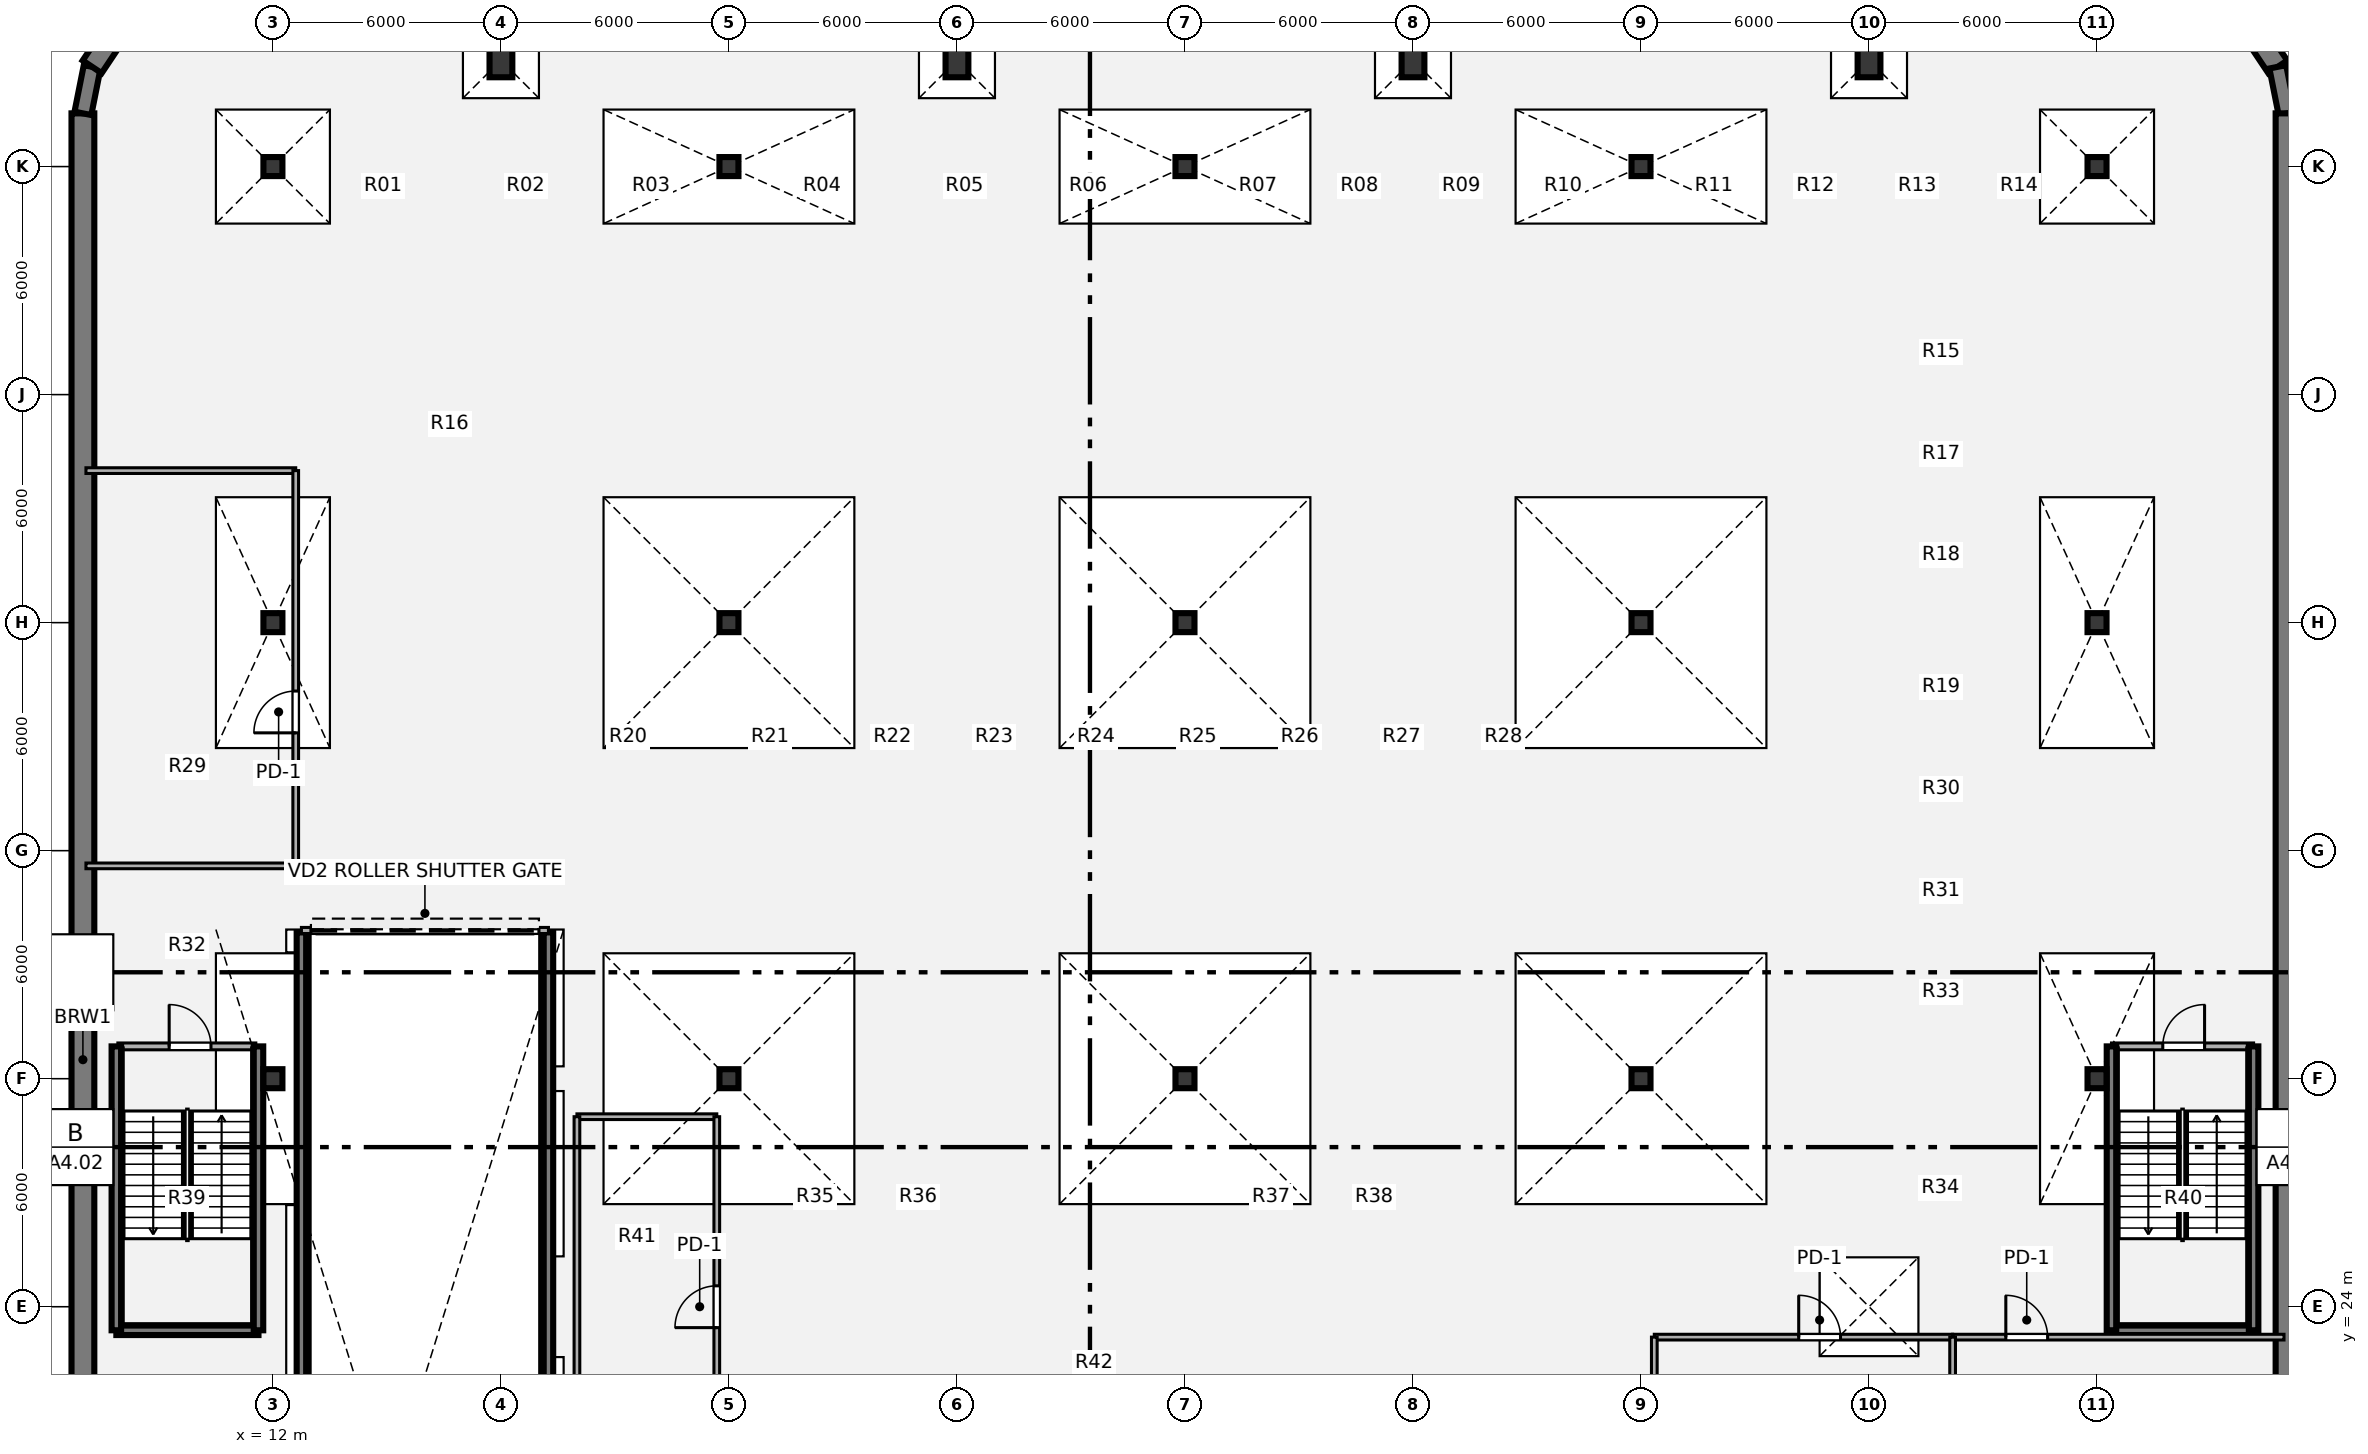
"""IFC4 building model, lengths in metres.
Left out: names, types, materials, properties, quantities, classifications, styles, units other than length and angle.
Written with IfcOpenShell. Run it as: python <this file> out.ifc"""

import sys

from ifc_helpers import new_model, si_unit, direction, frame, frame_2d, origin, origin_2d, place, context, subcontext, project, spatial, rectangle, i_section, extrude, source, transform, mapped, element, fill, save


model = new_model("IFC4")
c1 = context("Model", 3, precision=1e-05, world=origin(), true_north=direction((0.0, 1.0)))
c2 = subcontext(c1, "Body", "Model", "MODEL_VIEW")
j1 = project(units=[si_unit("LENGTHUNIT", "METRE"), si_unit("PLANEANGLEUNIT", "RADIAN")], contexts=[c1])
p1 = place(None, origin())
s1 = spatial("IfcSite", under=j1, at=p1, CompositionType="ELEMENT")
p2 = place(p1, origin())
s2 = spatial("IfcBuilding", under=s1, at=p2, CompositionType="ELEMENT")
p3 = place(p2, frame((0.0, 0.0, -4.86)))
s3 = spatial("IfcBuildingStorey", under=s2, at=p3, CompositionType="ELEMENT", Elevation=-4.86)
p4 = place(p3, frame((7.0, 5.6, 0.0), z_axis=(0.0, 0.0, 1.0), x_axis=(0.0, 1.0, 0.0)))
e1 = element("IfcWall", 1, at=p4, inside=s3, PredefinedType="USERDEFINED", context=c2, shape_type="SweptSolid", body=[
    extrude(rectangle(XDim=49.8, YDim=0.6, at=frame_2d((24.9, 0.0))), origin(), (0.0, 0.0, 1.0), 4.86),
])
p5 = place(p3, frame((7.0, 55.4, 0.0), z_axis=(0.0, 0.0, 1.0), x_axis=(0.195138390419, 0.980775717779, 0.0)))
e2 = element("IfcWall", 2, at=p5, inside=s3, PredefinedType="USERDEFINED", context=c2, shape_type="SweptSolid", body=[
    extrude(rectangle(XDim=1.249, YDim=0.45, at=frame_2d((0.624, 0.0))), origin(), (0.0, 0.0, 1.0), 4.86),
])
for number, where, z_axis, x_axis in (
    (3, (7.244, 56.625, 0.0), (0.0, 0.0, 1.0), (0.556, 0.831, 0.0)),
    (4, (64.063, 57.663, 0.0), (0.0, 0.0, 1.0), (0.556, -0.831, 0.0)),
):
    element("IfcWall", number, at=place(p3, frame(where, z_axis=z_axis, x_axis=x_axis)), inside=s3, PredefinedType="USERDEFINED", context=c2, shape_type="SweptSolid", body=[
        extrude(rectangle(XDim=1.249, YDim=0.6, at=frame_2d((0.624, 0.0))), origin(), (0.0, 0.0, 1.0), 4.86),
    ])
p6 = place(p3, frame((64.756, 56.625, 0.0), z_axis=(0.0, 0.0, 1.0), x_axis=(0.195138390419, -0.980775717779, 0.0)))
e5 = element("IfcWall", 5, at=p6, inside=s3, PredefinedType="USERDEFINED", context=c2, shape_type="SweptSolid", body=[
    extrude(rectangle(XDim=1.249, YDim=0.45, at=frame_2d((0.624, 0.0))), origin(), (0.0, 0.0, 1.0), 4.86),
])
p7 = place(p3, frame((65.0, 55.4, 0.0), z_axis=(0.0, 0.0, 1.0), x_axis=(0.0, -1.0, 0.0)))
e6 = element("IfcWall", 6, at=p7, inside=s3, PredefinedType="USERDEFINED", context=c2, shape_type="SweptSolid", body=[
    extrude(rectangle(XDim=49.8, YDim=0.6, at=frame_2d((24.9, 0.0))), origin(), (0.0, 0.0, 1.0), 4.86),
])
for number, where, z_axis, x_axis in (
    (7, (12.75, 5.64, 0.0), (0.0, 0.0, 1.0), (0.0, 1.0, 0.0)),
    (8, (19.25, 5.64, 0.0), (0.0, 0.0, 1.0), (0.0, 1.0, 0.0)),
):
    element("IfcWall", number, at=place(p3, frame(where, z_axis=z_axis, x_axis=x_axis)), inside=s3, PredefinedType="SHEAR", context=c2, shape_type="SweptSolid", body=[
        extrude(rectangle(XDim=28.21, YDim=0.25, at=frame_2d((14.105, 0.0))), origin(), (0.0, 0.0, 1.0), 4.86),
    ])
m1 = source(origin(), c2, "Body", "SweptSolid", [
    extrude(i_section(OverallWidth=0.5, OverallDepth=0.5, WebThickness=0.028, FlangeThickness=0.045, at=origin_2d()), origin(), (0.0, 0.0, 1.0), 4.86),
])
for number, where, z_axis, x_axis in (
    (9, (12.0, 30.0, 0.0), (0.0, 0.0, 1.0), (1.0, 0.0, 0.0)),
    (10, (24.0, 30.0, 0.0), (0.0, 0.0, 1.0), (1.0, 0.0, 0.0)),
    (11, (36.0, 30.0, 0.0), (0.0, 0.0, 1.0), (1.0, 0.0, 0.0)),
    (12, (48.0, 30.0, 0.0), (0.0, 0.0, 1.0), (1.0, 0.0, 0.0)),
    (13, (60.0, 30.0, 0.0), (0.0, 0.0, 1.0), (1.0, 0.0, 0.0)),
    (14, (12.0, 42.0, 0.0), (0.0, 0.0, 1.0), (1.0, 0.0, 0.0)),
    (15, (24.0, 42.0, 0.0), (0.0, 0.0, 1.0), (1.0, 0.0, 0.0)),
    (16, (36.0, 42.0, 0.0), (0.0, 0.0, 1.0), (1.0, 0.0, 0.0)),
    (17, (48.0, 42.0, 0.0), (0.0, 0.0, 1.0), (1.0, 0.0, 0.0)),
    (18, (60.0, 42.0, 0.0), (0.0, 0.0, 1.0), (1.0, 0.0, 0.0)),
    (19, (12.0, 54.0, 0.0), (0.0, 0.0, 1.0), (1.0, 0.0, 0.0)),
    (20, (24.0, 54.0, 0.0), (0.0, 0.0, 1.0), (1.0, 0.0, 0.0)),
    (21, (36.0, 54.0, 0.0), (0.0, 0.0, 1.0), (1.0, 0.0, 0.0)),
    (22, (48.0, 54.0, 0.0), (0.0, 0.0, 1.0), (1.0, 0.0, 0.0)),
    (23, (60.0, 54.0, 0.0), (0.0, 0.0, 1.0), (1.0, 0.0, 0.0)),
):
    element("IfcColumn", number, at=place(p3, frame(where, z_axis=z_axis, x_axis=x_axis)), inside=s3, PredefinedType="COLUMN", context=c2, shape_type="MappedRepresentation", body=[
        mapped(m1, transform((0.0, 0.0, 0.0), x_axis=(1.0, 0.0, 0.0), y_axis=(0.0, 1.0, 0.0), z_axis=(0.0, 0.0, 1.0), scale=1.0)),
    ])
m2 = source(origin(), c2, "Body", "SweptSolid", [
    extrude(rectangle(XDim=0.6, YDim=0.9, at=origin_2d()), origin(), (0.0, 0.0, 1.0), 4.86),
])
for number, where, z_axis, x_axis in (
    (24, (18.0, 56.8, 0.0), (0.0, 0.0, 1.0), (1.0, 0.0, 0.0)),
    (25, (30.0, 56.8, 0.0), (0.0, 0.0, 1.0), (1.0, 0.0, 0.0)),
    (26, (42.0, 56.8, 0.0), (0.0, 0.0, 1.0), (1.0, 0.0, 0.0)),
    (27, (54.0, 56.8, 0.0), (0.0, 0.0, 1.0), (1.0, 0.0, 0.0)),
):
    element("IfcColumn", number, at=place(p3, frame(where, z_axis=z_axis, x_axis=x_axis)), inside=s3, PredefinedType="PILASTER", context=c2, shape_type="MappedRepresentation", body=[
        mapped(m2, transform((0.0, 0.0, 0.0), x_axis=(1.0, 0.0, 0.0), y_axis=(0.0, 1.0, 0.0), z_axis=(0.0, 0.0, 1.0), scale=1.0)),
    ])
p8 = place(p3, frame((7.92, 30.85, 0.0), z_axis=(0.0, 0.0, 1.0), x_axis=(1.0, 0.0, 0.0)))
e28 = element("IfcWall", 28, at=p8, inside=s3, PredefinedType="PARTITIONING", context=c2, shape_type="SweptSolid", body=[
    extrude(rectangle(XDim=3.63, YDim=0.18, at=frame_2d((1.815, 0.0))), origin(), (0.0, 0.0, 1.0), 4.54),
])
p9 = place(p8, frame((1.35, 0.0, 0.0)))
e29 = element("IfcOpeningElement", 29, at=p9, cuts=e28, PredefinedType="OPENING", context=c2, shape_type="SweptSolid", body=[
    extrude(rectangle(XDim=1.1, YDim=2.1, at=origin_2d()), frame((0.55, 0.1, 1.05), z_axis=(0.0, -1.0, 0.0), x_axis=(1.0, 0.0, 0.0)), (0.0, 0.0, 1.0), 0.2),
])
p10 = place(p3, frame((7.88, 23.38, 0.0), z_axis=(0.0, 0.0, 1.0), x_axis=(1.0, 0.0, 0.0)))
e30 = element("IfcWall", 30, at=p10, inside=s3, PredefinedType="SHEAR", context=c2, shape_type="SweptSolid", body=[
    extrude(rectangle(XDim=3.74, YDim=0.25, at=frame_2d((1.87, 0.0))), origin(), (0.0, 0.0, 1.0), 4.86),
])
for number, where, z_axis, x_axis in (
    (31, (7.88, 23.38, 0.0), (0.0, 0.0, 1.0), (0.0, 1.0, 0.0)),
    (32, (11.62, 23.38, 0.0), (0.0, 0.0, 1.0), (0.0, 1.0, 0.0)),
):
    element("IfcWall", number, at=place(p3, frame(where, z_axis=z_axis, x_axis=x_axis)), inside=s3, PredefinedType="SHEAR", context=c2, shape_type="SweptSolid", body=[
        extrude(rectangle(XDim=7.47, YDim=0.25, at=frame_2d((3.735, 0.0))), origin(), (0.0, 0.0, 1.0), 4.86),
    ])
p11 = place(p3, frame((60.38, 30.85, 0.0), z_axis=(0.0, 0.0, 1.0), x_axis=(1.0, 0.0, 0.0)))
e33 = element("IfcWall", 33, at=p11, inside=s3, PredefinedType="PARTITIONING", context=c2, shape_type="SweptSolid", body=[
    extrude(rectangle(XDim=3.74, YDim=0.18, at=frame_2d((1.87, 0.0))), origin(), (0.0, 0.0, 1.0), 4.54),
])
p12 = place(p11, frame((1.35, 0.0, 0.0)))
e34 = element("IfcOpeningElement", 34, at=p12, cuts=e33, PredefinedType="OPENING", context=c2, shape_type="SweptSolid", body=[
    extrude(rectangle(XDim=1.1, YDim=2.1, at=origin_2d()), frame((0.55, 0.1, 1.05), z_axis=(0.0, -1.0, 0.0), x_axis=(1.0, 0.0, 0.0)), (0.0, 0.0, 1.0), 0.2),
])
p13 = place(p3, frame((60.38, 23.38, 0.0), z_axis=(0.0, 0.0, 1.0), x_axis=(1.0, 0.0, 0.0)))
e35 = element("IfcWall", 35, at=p13, inside=s3, PredefinedType="SHEAR", context=c2, shape_type="SweptSolid", body=[
    extrude(rectangle(XDim=3.74, YDim=0.25, at=frame_2d((1.87, 0.0))), origin(), (0.0, 0.0, 1.0), 4.86),
])
for number, where, z_axis, x_axis in (
    (36, (60.38, 23.38, 0.0), (0.0, 0.0, 1.0), (0.0, 1.0, 0.0)),
    (37, (64.12, 23.38, 0.0), (0.0, 0.0, 1.0), (0.0, 1.0, 0.0)),
):
    element("IfcWall", number, at=place(p3, frame(where, z_axis=z_axis, x_axis=x_axis)), inside=s3, PredefinedType="SHEAR", context=c2, shape_type="SweptSolid", body=[
        extrude(rectangle(XDim=7.47, YDim=0.25, at=frame_2d((3.735, 0.0))), origin(), (0.0, 0.0, 1.0), 4.86),
    ])
p14 = place(p3, frame((12.75, 33.9, 0.0), z_axis=(0.0, 0.0, 1.0), x_axis=(1.0, 0.0, 0.0)))
e38 = element("IfcWall", 38, at=p14, inside=s3, PredefinedType="PARTITIONING", context=c2, shape_type="SweptSolid", body=[
    extrude(rectangle(XDim=6.5, YDim=0.16, at=frame_2d((3.25, 0.0))), origin(), (0.0, 0.0, 1.0), 3.85),
])
p15 = place(p14, frame((0.25, 0.0, 0.0)))
e39 = element("IfcOpeningElement", 39, at=p15, cuts=e38, PredefinedType="OPENING", context=c2, shape_type="SweptSolid", body=[
    extrude(rectangle(XDim=6.0, YDim=3.2, at=origin_2d()), frame((3.0, 0.09, 1.6), z_axis=(0.0, -1.0, 0.0), x_axis=(1.0, 0.0, 0.0)), (0.0, 0.0, 1.0), 0.18),
])
p16 = place(p3, frame((48.35, 23.2, 0.0), z_axis=(0.0, 0.0, 1.0), x_axis=(1.0, 0.0, 0.0)))
e40 = element("IfcWall", 40, at=p16, inside=s3, PredefinedType="PARTITIONING", context=c2, shape_type="SweptSolid", body=[
    extrude(rectangle(XDim=7.85, YDim=0.15, at=frame_2d((3.925, 0.0))), origin(), (0.0, 0.0, 1.0), 4.51),
])
p17 = place(p16, frame((3.8, 0.0, 0.0)))
e41 = element("IfcOpeningElement", 41, at=p17, cuts=e40, PredefinedType="OPENING", context=c2, shape_type="SweptSolid", body=[
    extrude(rectangle(XDim=1.1, YDim=2.1, at=origin_2d()), frame((0.55, 0.085, 1.05), z_axis=(0.0, -1.0, 0.0), x_axis=(1.0, 0.0, 0.0)), (0.0, 0.0, 1.0), 0.17),
])
p18 = place(p3, frame((56.2, 23.2, 0.0), z_axis=(0.0, 0.0, 1.0), x_axis=(1.0, 0.0, 0.0)))
e42 = element("IfcWall", 42, at=p18, inside=s3, PredefinedType="PARTITIONING", context=c2, shape_type="SweptSolid", body=[
    extrude(rectangle(XDim=8.72, YDim=0.15, at=frame_2d((4.36, 0.0))), origin(), (0.0, 0.0, 1.0), 4.51),
])
p19 = place(p18, frame((1.4, 0.0, 0.0)))
e43 = element("IfcOpeningElement", 43, at=p19, cuts=e42, PredefinedType="OPENING", context=c2, shape_type="SweptSolid", body=[
    extrude(rectangle(XDim=1.1, YDim=2.1, at=origin_2d()), frame((0.55, 0.085, 1.05), z_axis=(0.0, -1.0, 0.0), x_axis=(1.0, 0.0, 0.0)), (0.0, 0.0, 1.0), 0.17),
])
p20 = place(p3, frame((20.0, 29.0, 0.0), z_axis=(0.0, 0.0, 1.0), x_axis=(1.0, 0.0, 0.0)))
e44 = element("IfcWall", 44, at=p20, inside=s3, PredefinedType="PARTITIONING", context=c2, shape_type="SweptSolid", body=[
    extrude(rectangle(XDim=3.68, YDim=0.15, at=frame_2d((1.84, 0.0))), origin(), (0.0, 0.0, 1.0), 4.51),
])
for number, where, z_axis, x_axis in (
    (45, (7.08, 35.6, 0.0), (0.0, 0.0, 1.0), (1.0, 0.0, 0.0)),
    (46, (7.08, 46.0, 0.0), (0.0, 0.0, 1.0), (1.0, 0.0, 0.0)),
):
    element("IfcWall", number, at=place(p3, frame(where, z_axis=z_axis, x_axis=x_axis)), inside=s3, PredefinedType="PARTITIONING", context=c2, shape_type="SweptSolid", body=[
        extrude(rectangle(XDim=5.52, YDim=0.15, at=frame_2d((2.76, 0.0))), origin(), (0.0, 0.0, 1.0), 4.51),
    ])
p21 = place(p3, frame((12.6, 35.6, 0.0), z_axis=(0.0, 0.0, 1.0), x_axis=(0.0, 1.0, 0.0)))
e47 = element("IfcWall", 47, at=p21, inside=s3, PredefinedType="PARTITIONING", context=c2, shape_type="SweptSolid", body=[
    extrude(rectangle(XDim=10.4, YDim=0.15, at=frame_2d((5.2, 0.0))), origin(), (0.0, 0.0, 1.0), 4.51),
])
p22 = place(p21, frame((3.5, 0.0, 0.0)))
e48 = element("IfcOpeningElement", 48, at=p22, cuts=e47, PredefinedType="OPENING", context=c2, shape_type="SweptSolid", body=[
    extrude(rectangle(XDim=1.1, YDim=2.1, at=origin_2d()), frame((0.55, 0.085, 1.05), z_axis=(0.0, -1.0, 0.0), x_axis=(1.0, 0.0, 0.0)), (0.0, 0.0, 1.0), 0.17),
])
p23 = place(p3, frame((20.0, 18.35, 0.0), z_axis=(0.0, 0.0, 1.0), x_axis=(0.0, 1.0, 0.0)))
e49 = element("IfcWall", 49, at=p23, inside=s3, PredefinedType="PARTITIONING", context=c2, shape_type="SweptSolid", body=[
    extrude(rectangle(XDim=10.65, YDim=0.15, at=frame_2d((5.325, 0.0))), origin(), (0.0, 0.0, 1.0), 3.725),
])
p24 = place(p3, frame((23.68, 18.35, 0.0), z_axis=(0.0, 0.0, 1.0), x_axis=(0.0, 1.0, 0.0)))
e50 = element("IfcWall", 50, at=p24, inside=s3, PredefinedType="PARTITIONING", context=c2, shape_type="SweptSolid", body=[
    extrude(rectangle(XDim=10.65, YDim=0.15, at=frame_2d((5.325, 0.0))), origin(), (0.0, 0.0, 1.0), 4.51),
])
p25 = place(p24, frame((5.1, 0.0, 0.0)))
e51 = element("IfcOpeningElement", 51, at=p25, cuts=e50, PredefinedType="OPENING", context=c2, shape_type="SweptSolid", body=[
    extrude(rectangle(XDim=1.1, YDim=2.1, at=origin_2d()), frame((0.55, 0.085, 1.05), z_axis=(0.0, -1.0, 0.0), x_axis=(1.0, 0.0, 0.0)), (0.0, 0.0, 1.0), 0.17),
])
p26 = place(p3, frame((48.35, 18.0, 0.0), z_axis=(0.0, 0.0, 1.0), x_axis=(0.0, 1.0, 0.0)))
e52 = element("IfcWall", 52, at=p26, inside=s3, PredefinedType="PARTITIONING", context=c2, shape_type="SweptSolid", body=[
    extrude(rectangle(XDim=5.2, YDim=0.15, at=frame_2d((2.6, 0.0))), origin(), (0.0, 0.0, 1.0), 4.51),
])
p27 = place(p3, frame((56.2, 6.2, 0.0), z_axis=(0.0, 0.0, 1.0), x_axis=(0.0, 1.0, 0.0)))
e53 = element("IfcWall", 53, at=p27, inside=s3, PredefinedType="PARTITIONING", context=c2, shape_type="SweptSolid", body=[
    extrude(rectangle(XDim=17.0, YDim=0.15, at=frame_2d((8.5, 0.0))), origin(), (0.0, 0.0, 1.0), 4.218),
])
m3 = source(origin(), c2, "Body", "SweptSolid", [
    extrude(rectangle(XDim=1.1, YDim=2.1, at=origin_2d()), frame((0.55, 0.025, 1.05), z_axis=(0.0, -1.0, 0.0), x_axis=(1.0, 0.0, 0.0)), (0.0, 0.0, 1.0), 0.05),
])
p28 = place(p9, origin())
e54 = element("IfcDoor", 54, at=p28, inside=s3, OperationType="SINGLE_SWING_LEFT", PredefinedType="DOOR", context=c2, shape_type="MappedRepresentation", body=[
    mapped(m3, transform((0.0, 0.0, 0.0), x_axis=(1.0, 0.0, 0.0), y_axis=(0.0, 1.0, 0.0), z_axis=(0.0, 0.0, 1.0), scale=1.0)),
])
fill(e29, e54)
p29 = place(p12, origin())
e55 = element("IfcDoor", 55, at=p29, inside=s3, OperationType="SINGLE_SWING_RIGHT", PredefinedType="DOOR", context=c2, shape_type="MappedRepresentation", body=[
    mapped(m3, transform((0.0, 0.0, 0.0), x_axis=(1.0, 0.0, 0.0), y_axis=(0.0, 1.0, 0.0), z_axis=(0.0, 0.0, 1.0), scale=1.0)),
])
fill(e34, e55)
m4 = source(origin(), c2, "Body", "SweptSolid", [
    extrude(rectangle(XDim=6.0, YDim=3.2, at=origin_2d()), frame((3.0, 0.025, 1.6), z_axis=(0.0, -1.0, 0.0), x_axis=(1.0, 0.0, 0.0)), (0.0, 0.0, 1.0), 0.05),
])
p30 = place(p15, origin())
e56 = element("IfcDoor", 56, at=p30, inside=s3, OperationType="ROLLINGUP", PredefinedType="GATE", context=c2, shape_type="MappedRepresentation", body=[
    mapped(m4, transform((0.0, 0.0, 0.0), x_axis=(1.0, 0.0, 0.0), y_axis=(0.0, 1.0, 0.0), z_axis=(0.0, 0.0, 1.0), scale=1.0)),
])
fill(e39, e56)
m5 = source(origin(), c2, "Body", "SweptSolid", [
    extrude(rectangle(XDim=1.1, YDim=2.1, at=origin_2d()), frame((0.55, 0.025, 1.05), z_axis=(0.0, -1.0, 0.0), x_axis=(1.0, 0.0, 0.0)), (0.0, 0.0, 1.0), 0.05),
])
p31 = place(p17, origin())
e57 = element("IfcDoor", 57, at=p31, inside=s3, OperationType="SINGLE_SWING_LEFT", PredefinedType="DOOR", context=c2, shape_type="MappedRepresentation", body=[
    mapped(m5, transform((0.0, 0.0, 0.0), x_axis=(1.0, 0.0, 0.0), y_axis=(0.0, 1.0, 0.0), z_axis=(0.0, 0.0, 1.0), scale=1.0)),
])
fill(e41, e57)
p32 = place(p19, origin())
e58 = element("IfcDoor", 58, at=p32, inside=s3, OperationType="SINGLE_SWING_LEFT", PredefinedType="DOOR", context=c2, shape_type="MappedRepresentation", body=[
    mapped(m5, transform((0.0, 0.0, 0.0), x_axis=(1.0, 0.0, 0.0), y_axis=(0.0, 1.0, 0.0), z_axis=(0.0, 0.0, 1.0), scale=1.0)),
])
fill(e43, e58)
p33 = place(p22, origin())
e59 = element("IfcDoor", 59, at=p33, inside=s3, OperationType="SINGLE_SWING_LEFT", PredefinedType="DOOR", context=c2, shape_type="MappedRepresentation", body=[
    mapped(m5, transform((0.0, 0.0, 0.0), x_axis=(1.0, 0.0, 0.0), y_axis=(0.0, 1.0, 0.0), z_axis=(0.0, 0.0, 1.0), scale=1.0)),
])
fill(e48, e59)
p34 = place(p25, origin())
e60 = element("IfcDoor", 60, at=p34, inside=s3, OperationType="SINGLE_SWING_LEFT", PredefinedType="DOOR", context=c2, shape_type="MappedRepresentation", body=[
    mapped(m5, transform((0.0, 0.0, 0.0), x_axis=(1.0, 0.0, 0.0), y_axis=(0.0, 1.0, 0.0), z_axis=(0.0, 0.0, 1.0), scale=1.0)),
])
fill(e51, e60)
save(model, sys.argv[1])
